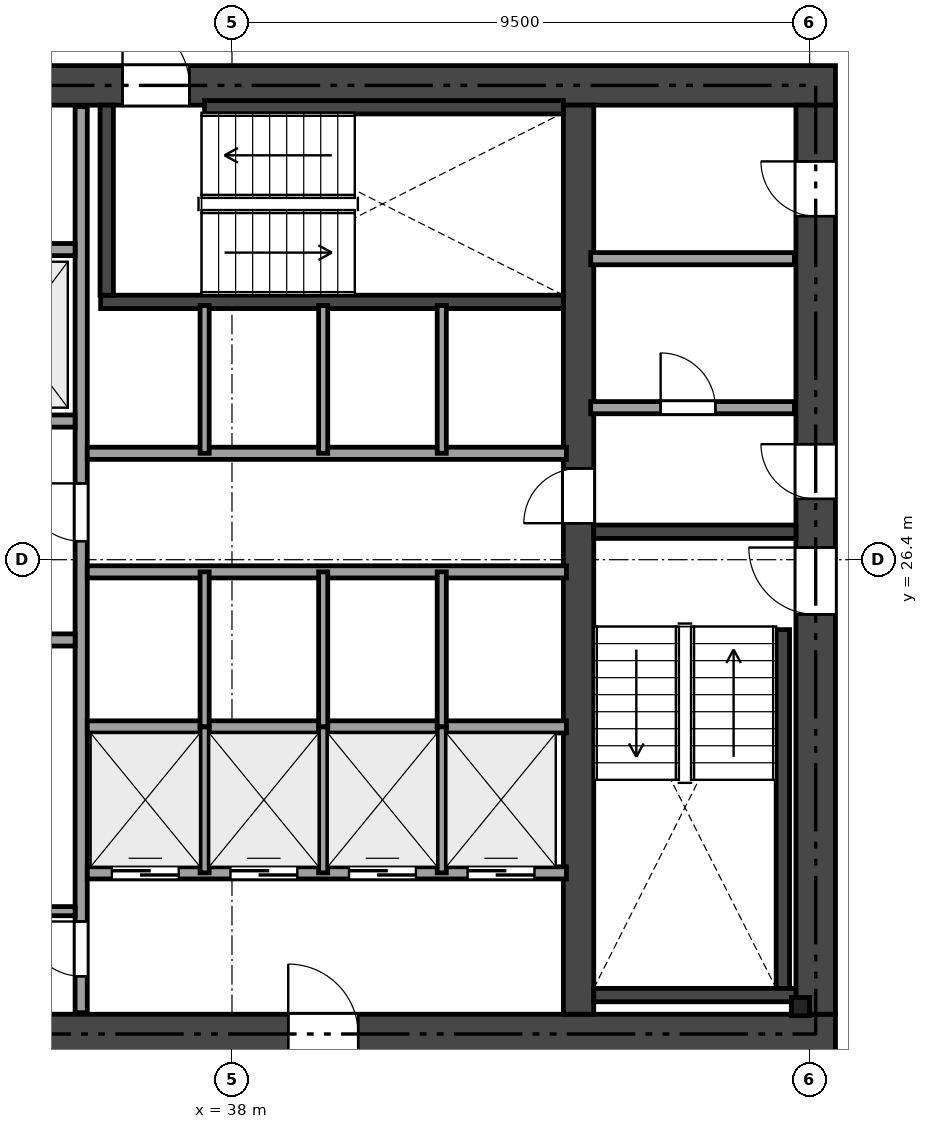
"""IFC4 building model, lengths in metres.
Left out: names, types, materials, properties, quantities, classifications, styles, units other than length and angle.
Written with IfcOpenShell. Run it as: python <this file> out.ifc"""

import sys

from ifc_helpers import new_model, si_unit, direction, frame, frame_2d, origin, origin_2d, place, context, subcontext, project, spatial, rectangle, i_section, extrude, element, fill, save


model = new_model("IFC4")
c1 = context("Model", 3, precision=1e-05, world=origin(), true_north=direction((0.0, 1.0)))
c2 = subcontext(c1, "Body", "Model", "MODEL_VIEW")
j1 = project(units=[si_unit("LENGTHUNIT", "METRE"), si_unit("PLANEANGLEUNIT", "RADIAN")], contexts=[c1])
p1 = place(None, origin())
s1 = spatial("IfcSite", under=j1, at=p1, CompositionType="ELEMENT")
p2 = place(p1, origin())
s2 = spatial("IfcBuilding", under=s1, at=p2, CompositionType="ELEMENT")
p3 = place(p2, frame((0.0, 0.0, 27.0)))
s3 = spatial("IfcBuildingStorey", under=s2, at=p3, CompositionType="ELEMENT", Elevation=27.0)
p4 = place(p3, frame((26.475, 18.6, 0.0), z_axis=(0.0, 0.0, 1.0), x_axis=(1.0, 0.0, 0.0)))
e1 = element("IfcWall", 1, at=p4, inside=s3, PredefinedType="SHEAR", context=c2, shape_type="SweptSolid", body=[
    extrude(rectangle(XDim=21.45, YDim=0.65, at=frame_2d((10.725, 0.0))), origin(), (0.0, 0.0, 1.0), 3.17),
])
p5 = place(p4, frame((12.45, 0.0, 0.0)))
e2 = element("IfcOpeningElement", 2, at=p5, cuts=e1, PredefinedType="OPENING", context=c2, shape_type="SweptSolid", body=[
    extrude(rectangle(XDim=1.15, YDim=2.15, at=frame_2d((0.575, 1.075))), frame((0.0, 0.335, 0.0), z_axis=(0.0, -1.0, 0.0), x_axis=(1.0, 0.0, 0.0)), (0.0, 0.0, 1.0), 0.67),
])
p6 = place(p4, frame((5.275, 0.0, 0.0)))
e3 = element("IfcOpeningElement", 3, at=p6, cuts=e1, PredefinedType="OPENING", context=c2, shape_type="SweptSolid", body=[
    extrude(rectangle(XDim=0.9, YDim=2.1, at=frame_2d((0.45, 1.05))), frame((0.0, 0.335, 0.0), z_axis=(0.0, -1.0, 0.0), x_axis=(1.0, 0.0, 0.0)), (0.0, 0.0, 1.0), 0.67),
])
p7 = place(p3, frame((26.475, 34.2, 0.0), z_axis=(0.0, 0.0, 1.0), x_axis=(1.0, 0.0, 0.0)))
e4 = element("IfcWall", 4, at=p7, inside=s3, PredefinedType="SHEAR", context=c2, shape_type="SweptSolid", body=[
    extrude(rectangle(XDim=21.45, YDim=0.65, at=frame_2d((10.725, 0.0))), origin(), (0.0, 0.0, 1.0), 3.17),
])
p8 = place(p7, frame((9.725, 0.0, 0.0)))
e5 = element("IfcOpeningElement", 5, at=p8, cuts=e4, PredefinedType="OPENING", context=c2, shape_type="SweptSolid", body=[
    extrude(rectangle(XDim=1.1, YDim=2.15, at=frame_2d((0.55, 1.075))), frame((0.0, 0.335, 0.0), z_axis=(0.0, -1.0, 0.0), x_axis=(1.0, 0.0, 0.0)), (0.0, 0.0, 1.0), 0.67),
])
p9 = place(p7, frame((1.975, 0.0, 0.0)))
e6 = element("IfcOpeningElement", 6, at=p9, cuts=e4, PredefinedType="OPENING", context=c2, shape_type="SweptSolid", body=[
    extrude(rectangle(XDim=0.9, YDim=2.1, at=frame_2d((0.45, 1.05))), frame((0.0, 0.335, 0.0), z_axis=(0.0, -1.0, 0.0), x_axis=(1.0, 0.0, 0.0)), (0.0, 0.0, 1.0), 0.67),
])
p10 = place(p7, frame((6.275, 0.0, 0.0)))
e7 = element("IfcOpeningElement", 7, at=p10, cuts=e4, PredefinedType="OPENING", context=c2, shape_type="SweptSolid", body=[
    extrude(rectangle(XDim=0.9, YDim=2.1, at=frame_2d((0.45, 1.05))), frame((0.0, 0.335, 0.0), z_axis=(0.0, -1.0, 0.0), x_axis=(1.0, 0.0, 0.0)), (0.0, 0.0, 1.0), 0.67),
])
p11 = place(p3, frame((47.6, 18.925, 0.0), z_axis=(0.0, 0.0, 1.0), x_axis=(0.0, 1.0, 0.0)))
e8 = element("IfcWall", 8, at=p11, inside=s3, PredefinedType="SHEAR", context=c2, shape_type="SweptSolid", body=[
    extrude(rectangle(XDim=14.95, YDim=0.65, at=frame_2d((7.475, 0.0))), origin(), (0.0, 0.0, 1.0), 3.17),
])
p12 = place(p11, frame((6.575, 0.0, 0.0)))
e9 = element("IfcOpeningElement", 9, at=p12, cuts=e8, PredefinedType="OPENING", context=c2, shape_type="SweptSolid", body=[
    extrude(rectangle(XDim=1.1, YDim=2.15, at=frame_2d((0.55, 1.075))), frame((0.0, 0.335, 0.0), z_axis=(0.0, -1.0, 0.0), x_axis=(1.0, 0.0, 0.0)), (0.0, 0.0, 1.0), 0.67),
])
p13 = place(p11, frame((8.475, 0.0, 0.0)))
e10 = element("IfcOpeningElement", 10, at=p13, cuts=e8, PredefinedType="OPENING", context=c2, shape_type="SweptSolid", body=[
    extrude(rectangle(XDim=0.9, YDim=2.1, at=frame_2d((0.45, 1.05))), frame((0.0, 0.335, 0.0), z_axis=(0.0, -1.0, 0.0), x_axis=(1.0, 0.0, 0.0)), (0.0, 0.0, 1.0), 0.67),
])
p14 = place(p11, frame((13.125, 0.0, 0.0)))
e11 = element("IfcOpeningElement", 11, at=p14, cuts=e8, PredefinedType="OPENING", context=c2, shape_type="SweptSolid", body=[
    extrude(rectangle(XDim=0.9, YDim=2.1, at=frame_2d((0.45, 1.05))), frame((0.0, 0.335, 0.0), z_axis=(0.0, -1.0, 0.0), x_axis=(1.0, 0.0, 0.0)), (0.0, 0.0, 1.0), 0.67),
])
p15 = place(p3, frame((43.7, 18.925, 0.0), z_axis=(0.0, 0.0, 1.0), x_axis=(0.0, 1.0, 0.0)))
e12 = element("IfcWall", 12, at=p15, inside=s3, PredefinedType="SHEAR", context=c2, shape_type="SweptSolid", body=[
    extrude(rectangle(XDim=14.95, YDim=0.5, at=frame_2d((7.475, 0.0))), origin(), (0.0, 0.0, 1.0), 3.17),
])
p16 = place(p15, frame((8.075, 0.0, 0.0)))
e13 = element("IfcOpeningElement", 13, at=p16, cuts=e12, PredefinedType="OPENING", context=c2, shape_type="SweptSolid", body=[
    extrude(rectangle(XDim=0.9, YDim=2.1, at=frame_2d((0.45, 1.05))), frame((0.0, 0.26, 0.0), z_axis=(0.0, -1.0, 0.0), x_axis=(1.0, 0.0, 0.0)), (0.0, 0.0, 1.0), 0.52),
])
p17 = place(p3, frame((43.95, 26.86, 0.0), z_axis=(0.0, 0.0, 1.0), x_axis=(1.0, 0.0, 0.0)))
e14 = element("IfcWall", 14, at=p17, inside=s3, PredefinedType="SHEAR", context=c2, shape_type="SweptSolid", body=[
    extrude(rectangle(XDim=3.325, YDim=0.22, at=frame_2d((1.663, 0.0))), origin(), (0.0, 0.0, 1.0), 3.17),
])
p18 = place(p3, frame((47.06, 19.35, 0.0), z_axis=(0.0, 0.0, 1.0), x_axis=(0.0, 1.0, 0.0)))
e15 = element("IfcWall", 15, at=p18, inside=s3, PredefinedType="SHEAR", context=c2, shape_type="SweptSolid", body=[
    extrude(rectangle(XDim=5.9, YDim=0.22, at=frame_2d((2.95, 0.0))), origin(), (0.0, 0.0, 1.0), 3.17),
])
p19 = place(p3, frame((43.95, 19.24, 0.0), z_axis=(0.0, 0.0, 1.0), x_axis=(1.0, 0.0, 0.0)))
e16 = element("IfcWall", 16, at=p19, inside=s3, PredefinedType="SHEAR", context=c2, shape_type="SweptSolid", body=[
    extrude(rectangle(XDim=3.325, YDim=0.22, at=frame_2d((1.663, 0.0))), origin(), (0.0, 0.0, 1.0), 3.17),
])
p20 = place(p3, frame((35.84, 30.64, 0.0), z_axis=(0.0, 0.0, 1.0), x_axis=(1.0, 0.0, 0.0)))
e17 = element("IfcWall", 17, at=p20, inside=s3, PredefinedType="SHEAR", context=c2, shape_type="SweptSolid", body=[
    extrude(rectangle(XDim=7.61, YDim=0.22, at=frame_2d((3.805, 0.0))), origin(), (0.0, 0.0, 1.0), 3.17),
])
p21 = place(p3, frame((35.94, 30.75, 0.0), z_axis=(0.0, 0.0, 1.0), x_axis=(0.0, 1.0, 0.0)))
e18 = element("IfcWall", 18, at=p21, inside=s3, PredefinedType="SHEAR", context=c2, shape_type="SweptSolid", body=[
    extrude(rectangle(XDim=3.125, YDim=0.22, at=frame_2d((1.562, 0.0))), origin(), (0.0, 0.0, 1.0), 3.17),
])
p22 = place(p3, frame((37.55, 33.84, 0.0), z_axis=(0.0, 0.0, 1.0), x_axis=(1.0, 0.0, 0.0)))
e19 = element("IfcWall", 19, at=p22, inside=s3, PredefinedType="SHEAR", context=c2, shape_type="SweptSolid", body=[
    extrude(rectangle(XDim=5.9, YDim=0.22, at=frame_2d((2.95, 0.0))), origin(), (0.0, 0.0, 1.0), 3.17),
])
p23 = place(p3, frame((47.35, 19.05, 0.0), z_axis=(0.0, 0.0, 1.0), x_axis=(1.0, 0.0, 0.0)))
e20 = element("IfcColumn", 20, at=p23, inside=s3, PredefinedType="PILASTER", context=c2, shape_type="SweptSolid", body=[
    extrude(i_section(OverallWidth=0.3, OverallDepth=0.3, WebThickness=0.011, FlangeThickness=0.019, at=origin_2d()), origin(), (0.0, 0.0, 1.0), 3.17),
])
p24 = place(p3, frame((43.9, 28.9, 0.0), z_axis=(0.0, 0.0, 1.0), x_axis=(1.0, 0.0, 0.0)))
e21 = element("IfcWall", 21, at=p24, inside=s3, PredefinedType="SOLIDWALL", context=c2, shape_type="SweptSolid", body=[
    extrude(rectangle(XDim=3.35, YDim=0.2, at=frame_2d((1.675, 0.0))), origin(), (0.0, 0.0, 1.0), 3.17),
])
p25 = place(p24, frame((1.15, 0.0, 0.0)))
e22 = element("IfcOpeningElement", 22, at=p25, cuts=e21, PredefinedType="OPENING", context=c2, shape_type="SweptSolid", body=[
    extrude(rectangle(XDim=0.9, YDim=2.1, at=frame_2d((0.45, 1.05))), frame((0.0, 0.11, 0.0), z_axis=(0.0, -1.0, 0.0), x_axis=(1.0, 0.0, 0.0)), (0.0, 0.0, 1.0), 0.22),
])
p26 = place(p3, frame((43.9, 31.35, 0.0), z_axis=(0.0, 0.0, 1.0), x_axis=(1.0, 0.0, 0.0)))
e23 = element("IfcWall", 23, at=p26, inside=s3, PredefinedType="SOLIDWALL", context=c2, shape_type="SweptSolid", body=[
    extrude(rectangle(XDim=3.35, YDim=0.2, at=frame_2d((1.675, 0.0))), origin(), (0.0, 0.0, 1.0), 3.17),
])
p27 = place(p3, frame((35.52, 18.95, 0.0), z_axis=(0.0, 0.0, 1.0), x_axis=(0.0, 1.0, 0.0)))
e24 = element("IfcWall", 24, at=p27, inside=s3, PredefinedType="SOLIDWALL", context=c2, shape_type="SweptSolid", body=[
    extrude(rectangle(XDim=14.9, YDim=0.2, at=frame_2d((7.45, 0.0))), origin(), (0.0, 0.0, 1.0), 2.691),
])
p28 = place(p27, frame((7.755, 0.0, 0.0)))
e25 = element("IfcOpeningElement", 25, at=p28, cuts=e24, PredefinedType="OPENING", context=c2, shape_type="SweptSolid", body=[
    extrude(rectangle(XDim=0.95, YDim=2.15, at=frame_2d((0.475, 1.075))), frame((0.0, 0.11, 0.0), z_axis=(0.0, -1.0, 0.0), x_axis=(1.0, 0.0, 0.0)), (0.0, 0.0, 1.0), 0.22),
])
p29 = place(p27, frame((0.6, 0.0, 0.0)))
e26 = element("IfcOpeningElement", 26, at=p29, cuts=e24, PredefinedType="OPENING", context=c2, shape_type="SweptSolid", body=[
    extrude(rectangle(XDim=0.9, YDim=2.1, at=frame_2d((0.45, 1.05))), frame((0.0, 0.11, 0.0), z_axis=(0.0, -1.0, 0.0), x_axis=(1.0, 0.0, 0.0)), (0.0, 0.0, 1.0), 0.22),
])
p30 = place(p3, frame((31.0, 28.68, 0.0), z_axis=(0.0, 0.0, 1.0), x_axis=(1.0, 0.0, 0.0)))
e27 = element("IfcWall", 27, at=p30, inside=s3, PredefinedType="SOLIDWALL", context=c2, shape_type="SweptSolid", body=[
    extrude(rectangle(XDim=4.42, YDim=0.2, at=frame_2d((2.21, 0.0))), origin(), (0.0, 0.0, 1.0), 3.17),
])
p31 = place(p30, frame((0.6, 0.0, 0.0)))
e28 = element("IfcOpeningElement", 28, at=p31, cuts=e27, PredefinedType="OPENING", context=c2, shape_type="SweptSolid", body=[
    extrude(rectangle(XDim=1.1, YDim=2.15, at=frame_2d((0.55, 1.075))), frame((0.0, 0.11, 0.0), z_axis=(0.0, -1.0, 0.0), x_axis=(1.0, 0.0, 0.0)), (0.0, 0.0, 1.0), 0.22),
])
p32 = place(p30, frame((2.85, 0.0, 0.0)))
e29 = element("IfcOpeningElement", 29, at=p32, cuts=e27, PredefinedType="OPENING", context=c2, shape_type="SweptSolid", body=[
    extrude(rectangle(XDim=1.1, YDim=2.15, at=frame_2d((0.55, 1.075))), frame((0.0, 0.11, 0.0), z_axis=(0.0, -1.0, 0.0), x_axis=(1.0, 0.0, 0.0)), (0.0, 0.0, 1.0), 0.22),
])
p33 = place(p3, frame((31.0, 31.5, 0.0), z_axis=(0.0, 0.0, 1.0), x_axis=(1.0, 0.0, 0.0)))
e30 = element("IfcWall", 30, at=p33, inside=s3, PredefinedType="SOLIDWALL", context=c2, shape_type="SweptSolid", body=[
    extrude(rectangle(XDim=4.42, YDim=0.2, at=frame_2d((2.21, 0.0))), origin(), (0.0, 0.0, 1.0), 3.17),
])
p34 = place(p3, frame((31.0, 25.08, 0.0), z_axis=(0.0, 0.0, 1.0), x_axis=(1.0, 0.0, 0.0)))
e31 = element("IfcWall", 31, at=p34, inside=s3, PredefinedType="SOLIDWALL", context=c2, shape_type="SweptSolid", body=[
    extrude(rectangle(XDim=4.42, YDim=0.2, at=frame_2d((2.21, 0.0))), origin(), (0.0, 0.0, 1.0), 3.17),
])
p35 = place(p34, frame((3.0, 0.0, 0.0)))
e32 = element("IfcOpeningElement", 32, at=p35, cuts=e31, PredefinedType="OPENING", context=c2, shape_type="SweptSolid", body=[
    extrude(rectangle(XDim=0.9, YDim=2.1, at=frame_2d((0.45, 1.05))), frame((0.0, 0.11, 0.0), z_axis=(0.0, -1.0, 0.0), x_axis=(1.0, 0.0, 0.0)), (0.0, 0.0, 1.0), 0.22),
])
p36 = place(p34, frame((0.62, 0.0, 0.0)))
e33 = element("IfcOpeningElement", 33, at=p36, cuts=e31, PredefinedType="OPENING", context=c2, shape_type="SweptSolid", body=[
    extrude(rectangle(XDim=1.2, YDim=2.15, at=frame_2d((0.6, 1.075))), frame((0.0, 0.11, 0.0), z_axis=(0.0, -1.0, 0.0), x_axis=(1.0, 0.0, 0.0)), (0.0, 0.0, 1.0), 0.22),
])
p37 = place(p3, frame((33.42, 20.62, 0.0), z_axis=(0.0, 0.0, 1.0), x_axis=(1.0, 0.0, 0.0)))
e34 = element("IfcWall", 34, at=p37, inside=s3, PredefinedType="PARTITIONING", context=c2, shape_type="SweptSolid", body=[
    extrude(rectangle(XDim=2.0, YDim=0.15, at=frame_2d((1.0, 0.0))), origin(), (0.0, 0.0, 1.0), 3.17),
])
for number, where, z_axis, x_axis in (
    (35, (35.62, 28.15, 0.0), (0.0, 0.0, 1.0), (1.0, 0.0, 0.0)),
    (36, (35.62, 26.2, 0.0), (0.0, 0.0, 1.0), (1.0, 0.0, 0.0)),
):
    element("IfcWall", number, at=place(p3, frame(where, z_axis=z_axis, x_axis=x_axis)), inside=s3, PredefinedType="SOLIDWALL", context=c2, shape_type="SweptSolid", body=[
        extrude(rectangle(XDim=7.88, YDim=0.2, at=frame_2d((3.94, 0.0))), origin(), (0.0, 0.0, 1.0), 3.17),
    ])
p38 = place(p3, frame((35.62, 23.65, 0.0), z_axis=(0.0, 0.0, 1.0), x_axis=(1.0, 0.0, 0.0)))
e37 = element("IfcWall", 37, at=p38, inside=s3, PredefinedType="SOLIDWALL", context=c2, shape_type="SweptSolid", body=[
    extrude(rectangle(XDim=7.88, YDim=0.2, at=frame_2d((3.94, 0.0))), origin(), (0.0, 0.0, 1.0), 2.691),
])
p39 = place(p3, frame((35.62, 21.25, 0.0), z_axis=(0.0, 0.0, 1.0), x_axis=(1.0, 0.0, 0.0)))
e38 = element("IfcWall", 38, at=p39, inside=s3, PredefinedType="SOLIDWALL", context=c2, shape_type="SweptSolid", body=[
    extrude(rectangle(XDim=7.88, YDim=0.2, at=frame_2d((3.94, 0.0))), origin(), (0.0, 0.0, 1.0), 3.17),
])
p40 = place(p39, frame((0.405, 0.0, 0.0)))
e39 = element("IfcOpeningElement", 39, at=p40, cuts=e38, PredefinedType="OPENING", context=c2, shape_type="SweptSolid", body=[
    extrude(rectangle(XDim=1.1, YDim=2.15, at=frame_2d((0.55, 1.075))), frame((0.0, 0.11, 0.0), z_axis=(0.0, -1.0, 0.0), x_axis=(1.0, 0.0, 0.0)), (0.0, 0.0, 1.0), 0.22),
])
p41 = place(p39, frame((2.355, 0.0, 0.0)))
e40 = element("IfcOpeningElement", 40, at=p41, cuts=e38, PredefinedType="OPENING", context=c2, shape_type="SweptSolid", body=[
    extrude(rectangle(XDim=1.1, YDim=2.15, at=frame_2d((0.55, 1.075))), frame((0.0, 0.11, 0.0), z_axis=(0.0, -1.0, 0.0), x_axis=(1.0, 0.0, 0.0)), (0.0, 0.0, 1.0), 0.22),
])
p42 = place(p39, frame((4.305, 0.0, 0.0)))
e41 = element("IfcOpeningElement", 41, at=p42, cuts=e38, PredefinedType="OPENING", context=c2, shape_type="SweptSolid", body=[
    extrude(rectangle(XDim=1.1, YDim=2.15, at=frame_2d((0.55, 1.075))), frame((0.0, 0.11, 0.0), z_axis=(0.0, -1.0, 0.0), x_axis=(1.0, 0.0, 0.0)), (0.0, 0.0, 1.0), 0.22),
])
p43 = place(p39, frame((6.255, 0.0, 0.0)))
e42 = element("IfcOpeningElement", 42, at=p43, cuts=e38, PredefinedType="OPENING", context=c2, shape_type="SweptSolid", body=[
    extrude(rectangle(XDim=1.1, YDim=2.15, at=frame_2d((0.55, 1.075))), frame((0.0, 0.11, 0.0), z_axis=(0.0, -1.0, 0.0), x_axis=(1.0, 0.0, 0.0)), (0.0, 0.0, 1.0), 0.22),
])
for number, where, z_axis, x_axis in (
    (43, (37.55, 28.15, 0.0), (0.0, 0.0, 1.0), (0.0, 1.0, 0.0)),
    (44, (39.5, 28.15, 0.0), (0.0, 0.0, 1.0), (0.0, 1.0, 0.0)),
    (45, (41.45, 28.15, 0.0), (0.0, 0.0, 1.0), (0.0, 1.0, 0.0)),
):
    element("IfcWall", number, at=place(p3, frame(where, z_axis=z_axis, x_axis=x_axis)), inside=s3, PredefinedType="PARTITIONING", context=c2, shape_type="SweptSolid", body=[
        extrude(rectangle(XDim=2.43, YDim=0.15, at=frame_2d((1.215, 0.0))), origin(), (0.0, 0.0, 1.0), 3.17),
    ])
for number, where, z_axis, x_axis in (
    (46, (37.55, 23.65, 0.0), (0.0, 0.0, 1.0), (0.0, 1.0, 0.0)),
    (47, (39.5, 23.65, 0.0), (0.0, 0.0, 1.0), (0.0, 1.0, 0.0)),
    (48, (41.45, 23.65, 0.0), (0.0, 0.0, 1.0), (0.0, 1.0, 0.0)),
):
    element("IfcWall", number, at=place(p3, frame(where, z_axis=z_axis, x_axis=x_axis)), inside=s3, PredefinedType="PARTITIONING", context=c2, shape_type="SweptSolid", body=[
        extrude(rectangle(XDim=2.55, YDim=0.15, at=frame_2d((1.275, 0.0))), origin(), (0.0, 0.0, 1.0), 2.691),
    ])
for number, where, z_axis, x_axis in (
    (49, (37.55, 21.25, 0.0), (0.0, 0.0, 1.0), (0.0, 1.0, 0.0)),
    (50, (39.5, 21.25, 0.0), (0.0, 0.0, 1.0), (0.0, 1.0, 0.0)),
    (51, (41.45, 21.25, 0.0), (0.0, 0.0, 1.0), (0.0, 1.0, 0.0)),
):
    element("IfcWall", number, at=place(p3, frame(where, z_axis=z_axis, x_axis=x_axis)), inside=s3, PredefinedType="PARTITIONING", context=c2, shape_type="SweptSolid", body=[
        extrude(rectangle(XDim=2.4, YDim=0.15, at=frame_2d((1.2, 0.0))), origin(), (0.0, 0.0, 1.0), 2.691),
    ])
p44 = place(p12, origin())
e52 = element("IfcDoor", 52, at=p44, inside=s3, OperationType="SINGLE_SWING_RIGHT", PredefinedType="DOOR", context=c2, shape_type="SweptSolid", body=[
    extrude(rectangle(XDim=1.1, YDim=2.15, at=frame_2d((0.55, 1.075))), frame((0.0, 0.025, 0.0), z_axis=(0.0, -1.0, 0.0), x_axis=(1.0, 0.0, 0.0)), (0.0, 0.0, 1.0), 0.05),
])
fill(e9, e52)
p45 = place(p8, origin())
e53 = element("IfcDoor", 53, at=p45, inside=s3, OperationType="SINGLE_SWING_LEFT", PredefinedType="DOOR", context=c2, shape_type="SweptSolid", body=[
    extrude(rectangle(XDim=1.1, YDim=2.15, at=frame_2d((0.55, 1.075))), frame((0.0, 0.025, 0.0), z_axis=(0.0, -1.0, 0.0), x_axis=(1.0, 0.0, 0.0)), (0.0, 0.0, 1.0), 0.05),
])
fill(e5, e53)
p46 = place(p28, origin())
e54 = element("IfcDoor", 54, at=p46, inside=s3, OperationType="SINGLE_SWING_RIGHT", PredefinedType="DOOR", context=c2, shape_type="SweptSolid", body=[
    extrude(rectangle(XDim=0.95, YDim=2.15, at=frame_2d((0.475, 1.075))), frame((0.0, 0.025, 0.0), z_axis=(0.0, -1.0, 0.0), x_axis=(1.0, 0.0, 0.0)), (0.0, 0.0, 1.0), 0.05),
])
fill(e25, e54)
p47 = place(p16, origin())
e55 = element("IfcDoor", 55, at=p47, inside=s3, OperationType="SINGLE_SWING_LEFT", PredefinedType="DOOR", context=c2, shape_type="SweptSolid", body=[
    extrude(rectangle(XDim=0.9, YDim=2.1, at=frame_2d((0.45, 1.05))), frame((0.0, 0.025, 0.0), z_axis=(0.0, -1.0, 0.0), x_axis=(1.0, 0.0, 0.0)), (0.0, 0.0, 1.0), 0.05),
])
fill(e13, e55)
p48 = place(p13, origin())
e56 = element("IfcDoor", 56, at=p48, inside=s3, OperationType="SINGLE_SWING_RIGHT", PredefinedType="DOOR", context=c2, shape_type="SweptSolid", body=[
    extrude(rectangle(XDim=0.9, YDim=2.1, at=frame_2d((0.45, 1.05))), frame((0.0, 0.025, 0.0), z_axis=(0.0, -1.0, 0.0), x_axis=(1.0, 0.0, 0.0)), (0.0, 0.0, 1.0), 0.05),
])
fill(e10, e56)
p49 = place(p5, origin())
e57 = element("IfcDoor", 57, at=p49, inside=s3, OperationType="SINGLE_SWING_LEFT", PredefinedType="DOOR", context=c2, shape_type="SweptSolid", body=[
    extrude(rectangle(XDim=1.15, YDim=2.15, at=frame_2d((0.575, 1.075))), frame((0.0, 0.025, 0.0), z_axis=(0.0, -1.0, 0.0), x_axis=(1.0, 0.0, 0.0)), (0.0, 0.0, 1.0), 0.05),
])
fill(e2, e57)
p50 = place(p25, origin())
e58 = element("IfcDoor", 58, at=p50, inside=s3, OperationType="SINGLE_SWING_LEFT", PredefinedType="DOOR", context=c2, shape_type="SweptSolid", body=[
    extrude(rectangle(XDim=0.9, YDim=2.1, at=frame_2d((0.45, 1.05))), frame((0.0, 0.025, 0.0), z_axis=(0.0, -1.0, 0.0), x_axis=(1.0, 0.0, 0.0)), (0.0, 0.0, 1.0), 0.05),
])
fill(e22, e58)
p51 = place(p14, origin())
e59 = element("IfcDoor", 59, at=p51, inside=s3, OperationType="SINGLE_SWING_RIGHT", PredefinedType="DOOR", context=c2, shape_type="SweptSolid", body=[
    extrude(rectangle(XDim=0.9, YDim=2.1, at=frame_2d((0.45, 1.05))), frame((0.0, 0.025, 0.0), z_axis=(0.0, -1.0, 0.0), x_axis=(1.0, 0.0, 0.0)), (0.0, 0.0, 1.0), 0.05),
])
fill(e11, e59)
p52 = place(p29, origin())
e60 = element("IfcDoor", 60, at=p52, inside=s3, OperationType="SINGLE_SWING_RIGHT", PredefinedType="DOOR", context=c2, shape_type="SweptSolid", body=[
    extrude(rectangle(XDim=0.9, YDim=2.1, at=frame_2d((0.45, 1.05))), frame((0.0, 0.025, 0.0), z_axis=(0.0, -1.0, 0.0), x_axis=(1.0, 0.0, 0.0)), (0.0, 0.0, 1.0), 0.05),
])
fill(e26, e60)
p53 = place(p40, origin())
e61 = element("IfcDoor", 61, at=p53, inside=s3, OperationType="SLIDING_TO_LEFT", PredefinedType="DOOR", context=c2, shape_type="SweptSolid", body=[
    extrude(rectangle(XDim=1.1, YDim=2.15, at=frame_2d((0.55, 1.075))), frame((0.0, 0.025, 0.0), z_axis=(0.0, -1.0, 0.0), x_axis=(1.0, 0.0, 0.0)), (0.0, 0.0, 1.0), 0.05),
])
fill(e39, e61)
p54 = place(p41, origin())
e62 = element("IfcDoor", 62, at=p54, inside=s3, OperationType="SLIDING_TO_LEFT", PredefinedType="DOOR", context=c2, shape_type="SweptSolid", body=[
    extrude(rectangle(XDim=1.1, YDim=2.15, at=frame_2d((0.55, 1.075))), frame((0.0, 0.025, 0.0), z_axis=(0.0, -1.0, 0.0), x_axis=(1.0, 0.0, 0.0)), (0.0, 0.0, 1.0), 0.05),
])
fill(e40, e62)
p55 = place(p42, origin())
e63 = element("IfcDoor", 63, at=p55, inside=s3, OperationType="SLIDING_TO_LEFT", PredefinedType="DOOR", context=c2, shape_type="SweptSolid", body=[
    extrude(rectangle(XDim=1.1, YDim=2.15, at=frame_2d((0.55, 1.075))), frame((0.0, 0.025, 0.0), z_axis=(0.0, -1.0, 0.0), x_axis=(1.0, 0.0, 0.0)), (0.0, 0.0, 1.0), 0.05),
])
fill(e41, e63)
p56 = place(p43, origin())
e64 = element("IfcDoor", 64, at=p56, inside=s3, OperationType="SLIDING_TO_LEFT", PredefinedType="DOOR", context=c2, shape_type="SweptSolid", body=[
    extrude(rectangle(XDim=1.1, YDim=2.15, at=frame_2d((0.55, 1.075))), frame((0.0, 0.025, 0.0), z_axis=(0.0, -1.0, 0.0), x_axis=(1.0, 0.0, 0.0)), (0.0, 0.0, 1.0), 0.05),
])
fill(e42, e64)
save(model, sys.argv[1])
